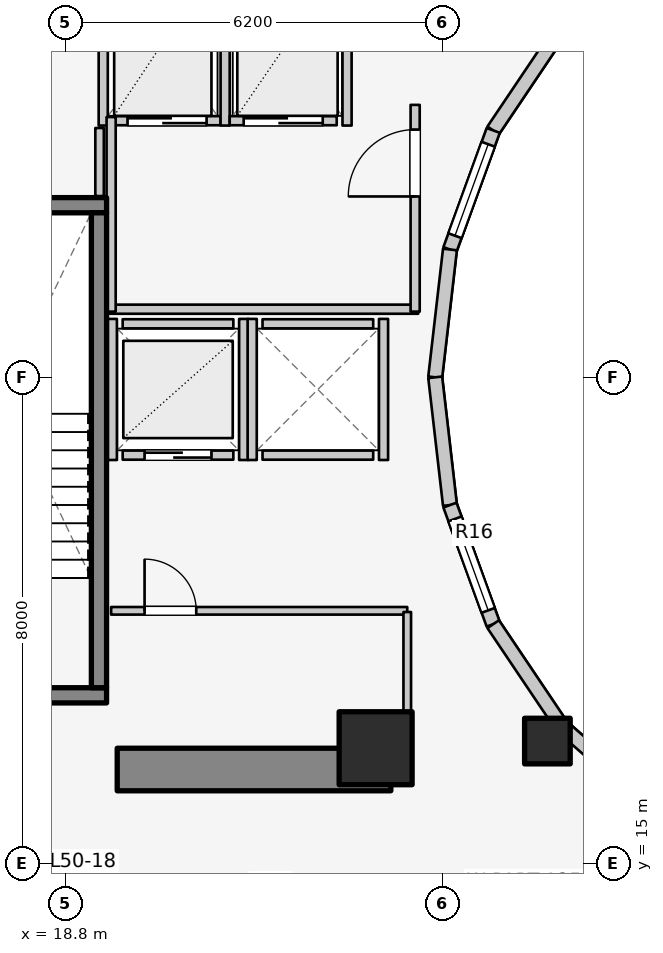
"""IFC4 building model, lengths in metres.
Left out: names, types, materials, properties, quantities, classifications, styles, units other than length and angle.
Written with IfcOpenShell. Run it as: python <this file> out.ifc"""

import sys

from ifc_helpers import new_model, si_unit, direction, frame, frame_2d, origin, origin_2d, place, context, subcontext, project, spatial, rectangle, extrude, element, fill, save


model = new_model("IFC4")
c1 = context("Model", 3, precision=1e-05, world=origin(), true_north=direction((0.0, 1.0)))
c2 = subcontext(c1, "Body", "Model", "MODEL_VIEW")
j1 = project(units=[si_unit("LENGTHUNIT", "METRE"), si_unit("PLANEANGLEUNIT", "RADIAN")], contexts=[c1])
p1 = place(None, origin())
s1 = spatial("IfcSite", under=j1, at=p1, CompositionType="ELEMENT")
p2 = place(p1, origin())
s2 = spatial("IfcBuilding", under=s1, at=p2, CompositionType="ELEMENT")
p3 = place(p2, frame((0.0, 0.0, 165.3)))
s3 = spatial("IfcBuildingStorey", under=s2, at=p3, CompositionType="ELEMENT", Elevation=165.3)
p4 = place(p3, frame((19.65, 16.55, 0.0), z_axis=(0.0, 0.0, 1.0), x_axis=(1.0, 0.0, 0.0)))
e1 = element("IfcWall", 1, at=p4, inside=s3, PredefinedType="SHEAR", context=c2, shape_type="SweptSolid", body=[
    extrude(rectangle(XDim=4.5, YDim=0.7, at=frame_2d((2.25, 0.0))), origin(), (0.0, 0.0, 1.0), 3.1),
])
p5 = place(p3, frame((16.105, 17.77, 0.0), z_axis=(0.0, 0.0, 1.0), x_axis=(1.0, 0.0, 0.0)))
e2 = element("IfcWall", 2, at=p5, inside=s3, PredefinedType="SOLIDWALL", context=c2, shape_type="SweptSolid", body=[
    extrude(rectangle(XDim=3.37, YDim=0.25, at=frame_2d((1.685, 0.0))), origin(), (0.0, 0.0, 1.0), 3.1),
])
p6 = place(p5, frame((1.135, 0.0, 0.0)))
e3 = element("IfcOpeningElement", 3, at=p6, cuts=e2, PredefinedType="OPENING", context=c2, shape_type="SweptSolid", body=[
    extrude(rectangle(XDim=1.1, YDim=2.1, at=frame_2d((0.55, 1.05))), frame((0.0, 0.135, 0.0), z_axis=(0.0, -1.0, 0.0), x_axis=(1.0, 0.0, 0.0)), (0.0, 0.0, 1.0), 0.27),
])
p7 = place(p3, frame((16.105, 25.83, 0.0), z_axis=(0.0, 0.0, 1.0), x_axis=(1.0, 0.0, 0.0)))
e4 = element("IfcWall", 4, at=p7, inside=s3, PredefinedType="SOLIDWALL", context=c2, shape_type="SweptSolid", body=[
    extrude(rectangle(XDim=3.37, YDim=0.25, at=frame_2d((1.685, 0.0))), origin(), (0.0, 0.0, 1.0), 3.1),
])
p8 = place(p3, frame((19.35, 17.895, 0.0), z_axis=(0.0, 0.0, 1.0), x_axis=(0.0, 1.0, 0.0)))
e5 = element("IfcWall", 5, at=p8, inside=s3, PredefinedType="SOLIDWALL", context=c2, shape_type="SweptSolid", body=[
    extrude(rectangle(XDim=7.81, YDim=0.25, at=frame_2d((3.905, 0.0))), origin(), (0.0, 0.0, 1.0), 3.1),
])
p9 = place(p3, frame((23.9, 16.9, 0.0), z_axis=(0.0, 0.0, 1.0), x_axis=(1.0, 0.0, 0.0)))
e6 = element("IfcColumn", 6, at=p9, inside=s3, PredefinedType="COLUMN", context=c2, shape_type="SweptSolid", body=[
    extrude(rectangle(XDim=1.2, YDim=1.2, at=origin_2d()), origin(), (0.0, 0.0, 1.0), 3.1),
])
p10 = place(p3, frame((26.725, 17.018, 0.0), z_axis=(0.0, 0.0, 1.0), x_axis=(1.0, 0.0, 0.0)))
e7 = element("IfcColumn", 7, at=p10, inside=s3, PredefinedType="COLUMN", context=c2, shape_type="SweptSolid", body=[
    extrude(rectangle(XDim=0.75, YDim=0.75, at=origin_2d()), origin(), (0.0, 0.0, 1.0), 3.1),
])
p11 = place(p3, frame((26.965, 28.742, 0.0), z_axis=(0.0, 0.0, 1.0), x_axis=(-0.558197800898, -0.829707909492, 0.0)))
e8 = element("IfcWall", 8, at=p11, inside=s3, PredefinedType="STANDARD", context=c2, shape_type="SweptSolid", body=[
    extrude(rectangle(XDim=2.027, YDim=0.23, at=frame_2d((1.013, 0.0))), origin(), (0.0, 0.0, 1.0), 2.16),
])
p12 = place(p3, frame((25.834, 27.06, 0.0), z_axis=(0.0, 0.0, 1.0), x_axis=(-0.341423187295, -0.93990968033, 0.0)))
e9 = element("IfcWall", 9, at=p12, inside=s3, PredefinedType="STANDARD", context=c2, shape_type="SweptSolid", body=[
    extrude(rectangle(XDim=2.084, YDim=0.23, at=frame_2d((1.042, 0.0))), origin(), (0.0, 0.0, 1.0), 2.84),
])
p13 = place(p12, frame((0.242, 0.0, 0.85)))
e10 = element("IfcOpeningElement", 10, at=p13, cuts=e9, PredefinedType="OPENING", context=c2, shape_type="SweptSolid", body=[
    extrude(rectangle(XDim=1.6, YDim=1.65, at=frame_2d((0.8, 0.825))), frame((0.0, 0.125, 0.0), z_axis=(0.0, -1.0, 0.0), x_axis=(1.0, 0.0, 0.0)), (0.0, 0.0, 1.0), 0.25),
])
for number, where, z_axis, x_axis in (
    (11, (25.123, 25.102, 0.0), (0.0, 0.0, 1.0), (-0.115, -0.993, 0.0)),
    (12, (24.88, 23.0, 0.0), (0.0, 0.0, 1.0), (0.115, -0.993, 0.0)),
):
    element("IfcWall", number, at=place(p3, frame(where, z_axis=z_axis, x_axis=x_axis)), inside=s3, PredefinedType="STANDARD", context=c2, shape_type="SweptSolid", body=[
        extrude(rectangle(XDim=2.115, YDim=0.23, at=frame_2d((1.058, 0.0))), origin(), (0.0, 0.0, 1.0), 2.84),
    ])
p14 = place(p3, frame((25.123, 20.898, 0.0), z_axis=(0.0, 0.0, 1.0), x_axis=(0.341423187295, -0.93990968033, 0.0)))
e13 = element("IfcWall", 13, at=p14, inside=s3, PredefinedType="STANDARD", context=c2, shape_type="SweptSolid", body=[
    extrude(rectangle(XDim=2.084, YDim=0.23, at=frame_2d((1.042, 0.0))), origin(), (0.0, 0.0, 1.0), 2.84),
])
p15 = place(p14, frame((0.242, 0.0, 0.85)))
e14 = element("IfcOpeningElement", 14, at=p15, cuts=e13, PredefinedType="OPENING", context=c2, shape_type="SweptSolid", body=[
    extrude(rectangle(XDim=1.6, YDim=1.65, at=frame_2d((0.8, 0.825))), frame((0.0, 0.125, 0.0), z_axis=(0.0, -1.0, 0.0), x_axis=(1.0, 0.0, 0.0)), (0.0, 0.0, 1.0), 0.25),
])
p16 = place(p3, frame((25.834, 18.94, 0.0), z_axis=(0.0, 0.0, 1.0), x_axis=(0.558197800898, -0.829707909492, 0.0)))
e15 = element("IfcWall", 15, at=p16, inside=s3, PredefinedType="STANDARD", context=c2, shape_type="SweptSolid", body=[
    extrude(rectangle(XDim=2.027, YDim=0.23, at=frame_2d((1.013, 0.0))), origin(), (0.0, 0.0, 1.0), 2.16),
])
p17 = place(p3, frame((26.965, 17.258, 0.0), z_axis=(0.0, 0.0, 1.0), x_axis=(0.752576694707, -0.658504607869, 0.0)))
e16 = element("IfcWall", 16, at=p17, inside=s3, PredefinedType="STANDARD", context=c2, shape_type="SweptSolid", body=[
    extrude(rectangle(XDim=1.959, YDim=0.23, at=frame_2d((0.98, 0.0))), origin(), (0.0, 0.0, 1.0), 2.16),
])
p18 = place(p3, frame((19.74, 21.72, 0.0), z_axis=(0.0, 0.0, 1.0), x_axis=(1.0, 0.0, 0.0)))
e17 = element("IfcWall", 17, at=p18, inside=s3, PredefinedType="SOLIDWALL", context=c2, shape_type="SweptSolid", body=[
    extrude(rectangle(XDim=1.82, YDim=0.15, at=frame_2d((0.91, 0.0))), origin(), (0.0, 0.0, 1.0), 2.855),
])
p19 = place(p18, frame((0.36, 0.0, 0.0)))
e18 = element("IfcOpeningElement", 18, at=p19, cuts=e17, PredefinedType="OPENING", context=c2, shape_type="SweptSolid", body=[
    extrude(rectangle(XDim=1.1, YDim=2.1, at=frame_2d((0.55, 1.05))), frame((0.0, 0.085, 0.0), z_axis=(0.0, -1.0, 0.0), x_axis=(1.0, 0.0, 0.0)), (0.0, 0.0, 1.0), 0.17),
])
p20 = place(p3, frame((19.74, 23.88, 0.0), z_axis=(0.0, 0.0, 1.0), x_axis=(1.0, 0.0, 0.0)))
e19 = element("IfcWall", 19, at=p20, inside=s3, PredefinedType="SOLIDWALL", context=c2, shape_type="SweptSolid", body=[
    extrude(rectangle(XDim=1.82, YDim=0.15, at=frame_2d((0.91, 0.0))), origin(), (0.0, 0.0, 1.0), 2.855),
])
for number, where, z_axis, x_axis in (
    (20, (19.57, 21.64, 0.0), (0.0, 0.0, 1.0), (0.0, 1.0, 0.0)),
    (21, (21.73, 21.64, 0.0), (0.0, 0.0, 1.0), (0.0, 1.0, 0.0)),
):
    element("IfcWall", number, at=place(p3, frame(where, z_axis=z_axis, x_axis=x_axis)), inside=s3, PredefinedType="SOLIDWALL", context=c2, shape_type="SweptSolid", body=[
        extrude(rectangle(XDim=2.32, YDim=0.15, at=frame_2d((1.16, 0.0))), origin(), (0.0, 0.0, 1.0), 2.855),
    ])
for number, where, z_axis, x_axis in (
    (22, (22.04, 21.72, 0.0), (0.0, 0.0, 1.0), (1.0, 0.0, 0.0)),
    (23, (22.04, 23.88, 0.0), (0.0, 0.0, 1.0), (1.0, 0.0, 0.0)),
):
    element("IfcWall", number, at=place(p3, frame(where, z_axis=z_axis, x_axis=x_axis)), inside=s3, PredefinedType="SOLIDWALL", context=c2, shape_type="SweptSolid", body=[
        extrude(rectangle(XDim=1.82, YDim=0.15, at=frame_2d((0.91, 0.0))), origin(), (0.0, 0.0, 1.0), 2.12),
    ])
p21 = place(p3, frame((21.87, 21.64, 0.0), z_axis=(0.0, 0.0, 1.0), x_axis=(0.0, 1.0, 0.0)))
e24 = element("IfcWall", 24, at=p21, inside=s3, PredefinedType="SOLIDWALL", context=c2, shape_type="SweptSolid", body=[
    extrude(rectangle(XDim=2.32, YDim=0.15, at=frame_2d((1.16, 0.0))), origin(), (0.0, 0.0, 1.0), 2.855),
])
p22 = place(p3, frame((24.03, 21.64, 0.0), z_axis=(0.0, 0.0, 1.0), x_axis=(0.0, 1.0, 0.0)))
e25 = element("IfcWall", 25, at=p22, inside=s3, PredefinedType="SOLIDWALL", context=c2, shape_type="SweptSolid", body=[
    extrude(rectangle(XDim=2.32, YDim=0.15, at=frame_2d((1.16, 0.0))), origin(), (0.0, 0.0, 1.0), 2.12),
])
p23 = place(p3, frame((19.59, 27.22, 0.0), z_axis=(0.0, 0.0, 1.0), x_axis=(1.0, 0.0, 0.0)))
e26 = element("IfcWall", 26, at=p23, inside=s3, PredefinedType="SOLIDWALL", context=c2, shape_type="SweptSolid", body=[
    extrude(rectangle(XDim=1.76, YDim=0.15, at=frame_2d((0.88, 0.0))), origin(), (0.0, 0.0, 1.0), 2.855),
])
p24 = place(p23, frame((0.23, 0.0, 0.0)))
e27 = element("IfcOpeningElement", 27, at=p24, cuts=e26, PredefinedType="OPENING", context=c2, shape_type="SweptSolid", body=[
    extrude(rectangle(XDim=1.3, YDim=2.1, at=frame_2d((0.65, 1.05))), frame((0.0, 0.085, 0.0), z_axis=(0.0, -1.0, 0.0), x_axis=(1.0, 0.0, 0.0)), (0.0, 0.0, 1.0), 0.17),
])
for number, where, z_axis, x_axis in (
    (28, (19.42, 27.14, 0.0), (0.0, 0.0, 1.0), (0.0, 1.0, 0.0)),
    (29, (21.425, 27.14, 0.0), (0.0, 0.0, 1.0), (0.0, 1.0, 0.0)),
):
    element("IfcWall", number, at=place(p3, frame(where, z_axis=z_axis, x_axis=x_axis)), inside=s3, PredefinedType="SOLIDWALL", context=c2, shape_type="SweptSolid", body=[
        extrude(rectangle(XDim=2.72, YDim=0.15, at=frame_2d((1.36, 0.0))), origin(), (0.0, 0.0, 1.0), 2.855),
    ])
p25 = place(p3, frame((21.5, 27.22, 0.0), z_axis=(0.0, 0.0, 1.0), x_axis=(1.0, 0.0, 0.0)))
e30 = element("IfcWall", 30, at=p25, inside=s3, PredefinedType="SOLIDWALL", context=c2, shape_type="SweptSolid", body=[
    extrude(rectangle(XDim=1.76, YDim=0.15, at=frame_2d((0.88, 0.0))), origin(), (0.0, 0.0, 1.0), 2.855),
])
p26 = place(p25, frame((0.23, 0.0, 0.0)))
e31 = element("IfcOpeningElement", 31, at=p26, cuts=e30, PredefinedType="OPENING", context=c2, shape_type="SweptSolid", body=[
    extrude(rectangle(XDim=1.3, YDim=2.1, at=frame_2d((0.65, 1.05))), frame((0.0, 0.085, 0.0), z_axis=(0.0, -1.0, 0.0), x_axis=(1.0, 0.0, 0.0)), (0.0, 0.0, 1.0), 0.17),
])
p27 = place(p3, frame((23.43, 27.14, 0.0), z_axis=(0.0, 0.0, 1.0), x_axis=(0.0, 1.0, 0.0)))
e32 = element("IfcWall", 32, at=p27, inside=s3, PredefinedType="SOLIDWALL", context=c2, shape_type="SweptSolid", body=[
    extrude(rectangle(XDim=2.72, YDim=0.15, at=frame_2d((1.36, 0.0))), origin(), (0.0, 0.0, 1.0), 2.855),
])
p28 = place(p3, frame((19.52, 24.12, 0.0), z_axis=(0.0, 0.0, 1.0), x_axis=(1.0, 0.0, 0.0)))
e33 = element("IfcWall", 33, at=p28, inside=s3, PredefinedType="PARTITIONING", context=c2, shape_type="SweptSolid", body=[
    extrude(rectangle(XDim=5.08, YDim=0.15, at=frame_2d((2.54, 0.0))), origin(), (0.0, 0.0, 1.0), 2.12),
])
p29 = place(p3, frame((19.55, 24.08, 0.0), z_axis=(0.0, 0.0, 1.0), x_axis=(0.0, 1.0, 0.0)))
e34 = element("IfcWall", 34, at=p29, inside=s3, PredefinedType="PARTITIONING", context=c2, shape_type="SweptSolid", body=[
    extrude(rectangle(XDim=3.2, YDim=0.15, at=frame_2d((1.6, 0.0))), origin(), (0.0, 0.0, 1.0), 2.855),
])
p30 = place(p3, frame((24.55, 24.08, 0.0), z_axis=(0.0, 0.0, 1.0), x_axis=(0.0, 1.0, 0.0)))
e35 = element("IfcWall", 35, at=p30, inside=s3, PredefinedType="PARTITIONING", context=c2, shape_type="SweptSolid", body=[
    extrude(rectangle(XDim=3.4, YDim=0.15, at=frame_2d((1.7, 0.0))), origin(), (0.0, 0.0, 1.0), 2.855),
])
p31 = place(p30, frame((1.894, 0.0, 0.0)))
e36 = element("IfcOpeningElement", 36, at=p31, cuts=e35, PredefinedType="OPENING", context=c2, shape_type="SweptSolid", body=[
    extrude(rectangle(XDim=1.1, YDim=2.1, at=frame_2d((0.55, 1.05))), frame((0.0, 0.085, 0.0), z_axis=(0.0, -1.0, 0.0), x_axis=(1.0, 0.0, 0.0)), (0.0, 0.0, 1.0), 0.17),
])
p32 = place(p3, frame((19.55, 19.16, 0.0), z_axis=(0.0, 0.0, 1.0), x_axis=(1.0, 0.0, 0.0)))
e37 = element("IfcWall", 37, at=p32, inside=s3, PredefinedType="PARTITIONING", context=c2, shape_type="SweptSolid", body=[
    extrude(rectangle(XDim=4.87, YDim=0.125, at=frame_2d((2.435, 0.0))), origin(), (0.0, 0.0, 1.0), 2.12),
])
p33 = place(p32, frame((0.55, 0.0, 0.0)))
e38 = element("IfcOpeningElement", 38, at=p33, cuts=e37, PredefinedType="OPENING", context=c2, shape_type="SweptSolid", body=[
    extrude(rectangle(XDim=0.85, YDim=2.05, at=frame_2d((0.425, 1.025))), frame((0.0, 0.073, 0.0), z_axis=(0.0, -1.0, 0.0), x_axis=(1.0, 0.0, 0.0)), (0.0, 0.0, 1.0), 0.145),
])
p34 = place(p3, frame((24.42, 17.1, 0.0), z_axis=(0.0, 0.0, 1.0), x_axis=(0.0, 1.0, 0.0)))
e39 = element("IfcWall", 39, at=p34, inside=s3, PredefinedType="PARTITIONING", context=c2, shape_type="SweptSolid", body=[
    extrude(rectangle(XDim=2.04, YDim=0.125, at=frame_2d((1.02, 0.0))), origin(), (0.0, 0.0, 1.0), 2.232),
])
p35 = place(p3, frame((19.36, 25.98, 0.0), z_axis=(0.0, 0.0, 1.0), x_axis=(0.0, 1.0, 0.0)))
e40 = element("IfcWall", 40, at=p35, inside=s3, PredefinedType="PLUMBINGWALL", context=c2, shape_type="SweptSolid", body=[
    extrude(rectangle(XDim=1.12, YDim=0.14, at=frame_2d((0.56, 0.0))), origin(), (0.0, 0.0, 1.0), 2.855),
])
p36 = place(p3, frame((28.45, 15.985, 0.0), z_axis=(0.0, 0.0, 1.0), x_axis=(-0.524565340045, -0.851370192116, 0.0)))
e41 = element("IfcWall", 41, at=p36, inside=s3, PredefinedType="PARTITIONING", context=c2, shape_type="SweptSolid", body=[
    extrude(rectangle(XDim=3.027, YDim=0.125, at=frame_2d((1.514, 0.0))), origin(), (0.0, 0.0, 1.0), 2.299),
])
p37 = place(p13, origin())
e42 = element("IfcWindow", 42, at=p37, inside=s3, PartitioningType="SINGLE_PANEL", PredefinedType="WINDOW", context=c2, shape_type="SweptSolid", body=[
    extrude(rectangle(XDim=1.6, YDim=1.65, at=frame_2d((0.8, 0.825))), frame((0.0, 0.03, 0.0), z_axis=(0.0, -1.0, 0.0), x_axis=(1.0, 0.0, 0.0)), (0.0, 0.0, 1.0), 0.06),
])
fill(e10, e42)
p38 = place(p15, origin())
e43 = element("IfcWindow", 43, at=p38, inside=s3, PartitioningType="SINGLE_PANEL", PredefinedType="WINDOW", context=c2, shape_type="SweptSolid", body=[
    extrude(rectangle(XDim=1.6, YDim=1.65, at=frame_2d((0.8, 0.825))), frame((0.0, 0.03, 0.0), z_axis=(0.0, -1.0, 0.0), x_axis=(1.0, 0.0, 0.0)), (0.0, 0.0, 1.0), 0.06),
])
fill(e14, e43)
p39 = place(p19, origin())
e44 = element("IfcDoor", 44, at=p39, inside=s3, OperationType="DOUBLE_DOOR_SLIDING", PredefinedType="DOOR", context=c2, shape_type="SweptSolid", body=[
    extrude(rectangle(XDim=1.1, YDim=2.1, at=frame_2d((0.55, 1.05))), frame((0.0, 0.025, 0.0), z_axis=(0.0, -1.0, 0.0), x_axis=(1.0, 0.0, 0.0)), (0.0, 0.0, 1.0), 0.05),
])
fill(e18, e44)
p40 = place(p24, origin())
e45 = element("IfcDoor", 45, at=p40, inside=s3, OperationType="DOUBLE_DOOR_SLIDING", PredefinedType="DOOR", context=c2, shape_type="SweptSolid", body=[
    extrude(rectangle(XDim=1.3, YDim=2.1, at=frame_2d((0.65, 1.05))), frame((0.0, 0.025, 0.0), z_axis=(0.0, -1.0, 0.0), x_axis=(1.0, 0.0, 0.0)), (0.0, 0.0, 1.0), 0.05),
])
fill(e27, e45)
p41 = place(p26, origin())
e46 = element("IfcDoor", 46, at=p41, inside=s3, OperationType="DOUBLE_DOOR_SLIDING", PredefinedType="DOOR", context=c2, shape_type="SweptSolid", body=[
    extrude(rectangle(XDim=1.3, YDim=2.1, at=frame_2d((0.65, 1.05))), frame((0.0, 0.025, 0.0), z_axis=(0.0, -1.0, 0.0), x_axis=(1.0, 0.0, 0.0)), (0.0, 0.0, 1.0), 0.05),
])
fill(e31, e46)
p42 = place(p31, origin())
e47 = element("IfcDoor", 47, at=p42, inside=s3, OperationType="SINGLE_SWING_LEFT", PredefinedType="DOOR", context=c2, shape_type="SweptSolid", body=[
    extrude(rectangle(XDim=1.1, YDim=2.1, at=frame_2d((0.55, 1.05))), frame((0.0, 0.025, 0.0), z_axis=(0.0, -1.0, 0.0), x_axis=(1.0, 0.0, 0.0)), (0.0, 0.0, 1.0), 0.05),
])
fill(e36, e47)
p43 = place(p33, origin())
e48 = element("IfcDoor", 48, at=p43, inside=s3, OperationType="SINGLE_SWING_LEFT", PredefinedType="DOOR", context=c2, shape_type="SweptSolid", body=[
    extrude(rectangle(XDim=0.85, YDim=2.05, at=frame_2d((0.425, 1.025))), frame((0.0, 0.025, 0.0), z_axis=(0.0, -1.0, 0.0), x_axis=(1.0, 0.0, 0.0)), (0.0, 0.0, 1.0), 0.05),
])
fill(e38, e48)
save(model, sys.argv[1])
